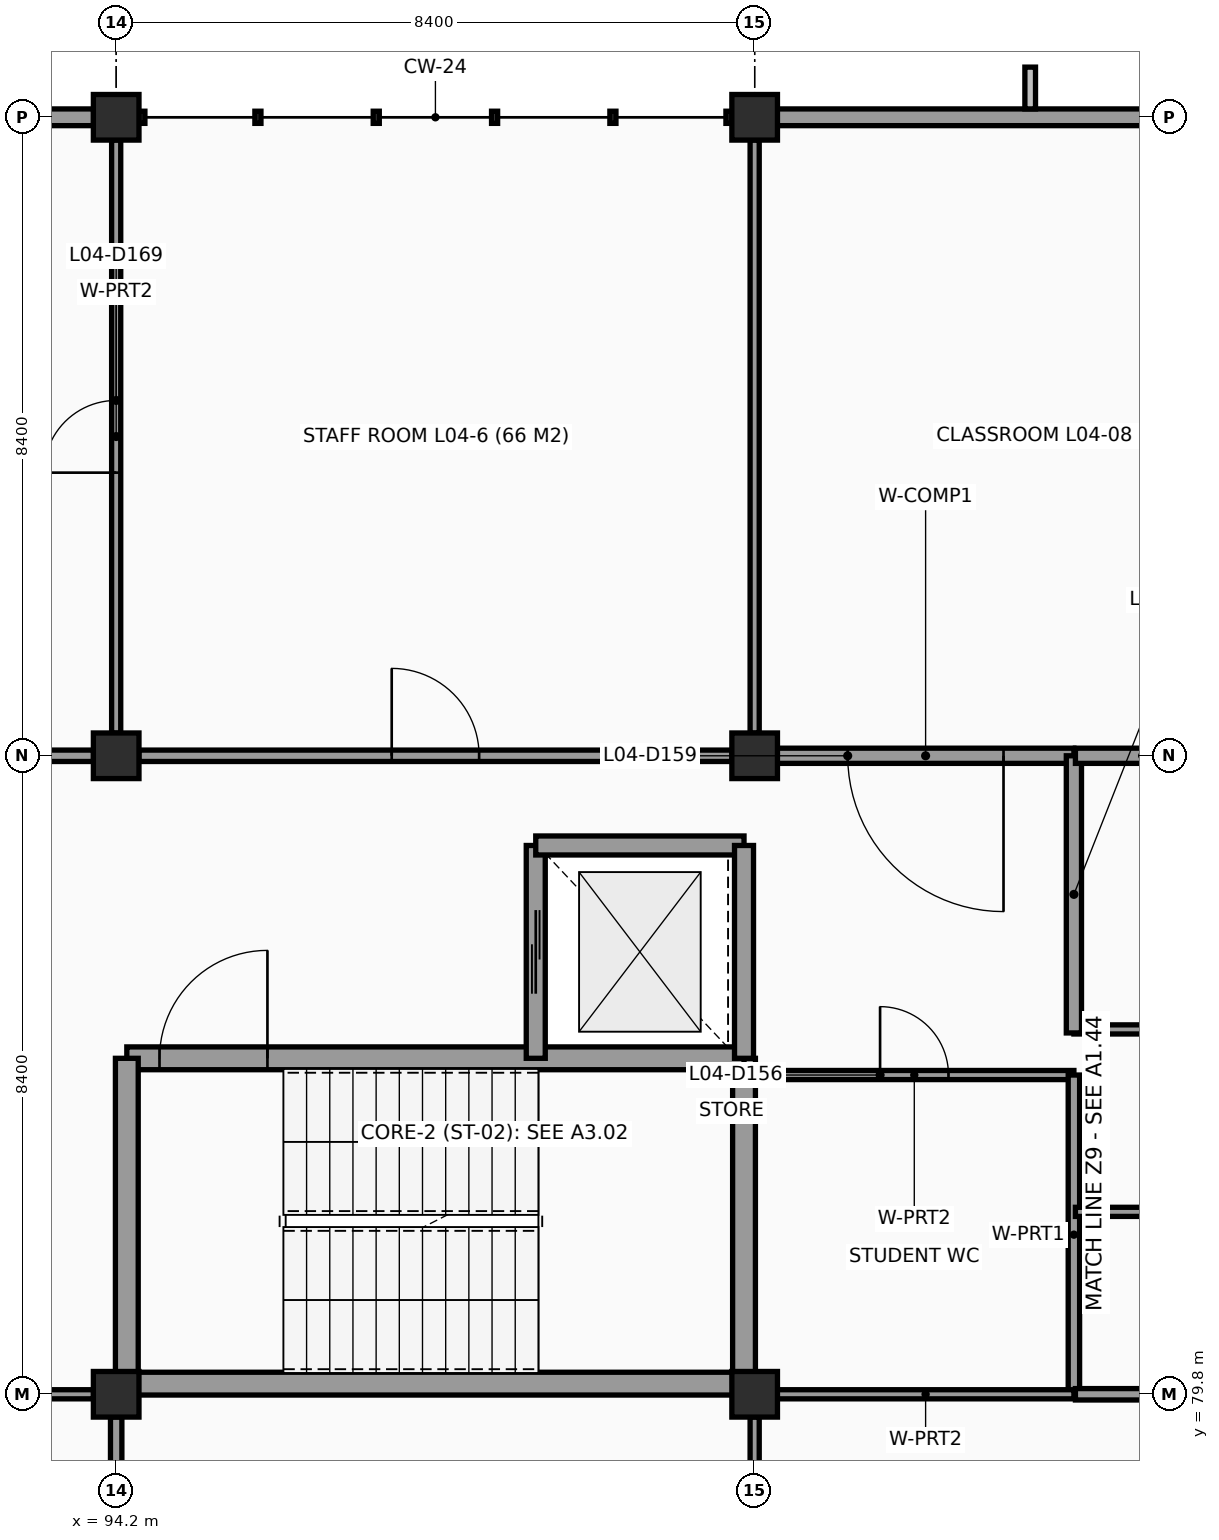
"""IFC4 building model, lengths in metres.
Left out: names, types, materials, properties, quantities, classifications, styles, units other than length and angle.
Written with IfcOpenShell. Run it as: python <this file> out.ifc"""

import sys

from ifc_helpers import new_model, si_unit, direction, frame, frame_2d, origin, origin_2d, place, context, subcontext, project, spatial, rectangle, extrude, element, fill, save


model = new_model("IFC4")
c1 = context("Model", 3, precision=1e-05, world=origin(), true_north=direction((0.0, 1.0)))
c2 = subcontext(c1, "Body", "Model", "MODEL_VIEW")
j1 = project(units=[si_unit("LENGTHUNIT", "METRE"), si_unit("PLANEANGLEUNIT", "RADIAN")], contexts=[c1])
p1 = place(None, origin())
s1 = spatial("IfcSite", under=j1, at=p1, CompositionType="ELEMENT")
p2 = place(p1, origin())
s2 = spatial("IfcBuilding", under=s1, at=p2, CompositionType="ELEMENT")
p3 = place(p2, frame((0.0, 0.0, 15.0)))
s3 = spatial("IfcBuildingStorey", under=s2, at=p3, CompositionType="ELEMENT", Elevation=15.0)
for number, where, z_axis, x_axis in (
    (1, (94.2, 79.8, 0.0), (0.0, 0.0, 1.0), (1.0, 0.0, 0.0)),
    (2, (94.2, 88.2, 0.0), (0.0, 0.0, 1.0), (1.0, 0.0, 0.0)),
    (3, (94.2, 96.6, 0.0), (0.0, 0.0, 1.0), (1.0, 0.0, 0.0)),
    (4, (102.6, 79.8, 0.0), (0.0, 0.0, 1.0), (1.0, 0.0, 0.0)),
    (5, (102.6, 88.2, 0.0), (0.0, 0.0, 1.0), (1.0, 0.0, 0.0)),
    (6, (102.6, 96.6, 0.0), (0.0, 0.0, 1.0), (1.0, 0.0, 0.0)),
):
    element("IfcColumn", number, at=place(p3, frame(where, z_axis=z_axis, x_axis=x_axis)), inside=s3, PredefinedType="COLUMN", context=c2, shape_type="SweptSolid", body=[
        extrude(rectangle(XDim=0.6, YDim=0.6, at=origin_2d()), origin(), (0.0, 0.0, 1.0), 3.6),
    ])
p4 = place(p3, frame((86.098, 96.6, 0.0), z_axis=(0.0, 0.0, 1.0), x_axis=(1.0, 0.0, 0.0)))
e7 = element("IfcWall", 7, at=p4, inside=s3, PredefinedType="SOLIDWALL", context=c2, shape_type="SweptSolid", body=[
    extrude(rectangle(XDim=7.804, YDim=0.22, at=frame_2d((3.902, 0.0))), origin(), (0.0, 0.0, 1.0), 2.65),
])
p5 = place(p4, frame((2.252, 0.0, 0.95)))
e8 = element("IfcOpeningElement", 8, at=p5, cuts=e7, PredefinedType="OPENING", context=c2, shape_type="SweptSolid", body=[
    extrude(rectangle(XDim=3.3, YDim=1.2, at=frame_2d((1.65, 0.6))), frame((0.0, 0.12, 0.0), z_axis=(0.0, -1.0, 0.0), x_axis=(1.0, 0.0, 0.0)), (0.0, 0.0, 1.0), 0.24),
])
p6 = place(p3, frame((102.898, 96.6, 0.0), z_axis=(0.0, 0.0, 1.0), x_axis=(1.0, 0.0, 0.0)))
e9 = element("IfcWall", 9, at=p6, inside=s3, PredefinedType="SOLIDWALL", context=c2, shape_type="SweptSolid", body=[
    extrude(rectangle(XDim=6.654, YDim=0.22, at=frame_2d((3.327, 0.0))), origin(), (0.0, 0.0, 1.0), 2.58),
])
p7 = place(p3, frame((94.34, 79.94, 0.0), z_axis=(0.0, 0.0, 1.0), x_axis=(1.0, 0.0, 0.0)))
e10 = element("IfcWall", 10, at=p7, inside=s3, PredefinedType="SHEAR", context=c2, shape_type="SweptSolid", body=[
    extrude(rectangle(XDim=8.12, YDim=0.3, at=frame_2d((4.06, 0.0))), origin(), (0.0, 0.0, 1.0), 3.6),
])
p8 = place(p3, frame((102.46, 79.94, 0.0), z_axis=(0.0, 0.0, 1.0), x_axis=(0.0, 1.0, 0.0)))
e11 = element("IfcWall", 11, at=p8, inside=s3, PredefinedType="SHEAR", context=c2, shape_type="SweptSolid", body=[
    extrude(rectangle(XDim=4.28, YDim=0.3, at=frame_2d((2.14, 0.0))), origin(), (0.0, 0.0, 1.0), 3.6),
])
p9 = place(p3, frame((102.46, 84.22, 0.0), z_axis=(0.0, 0.0, 1.0), x_axis=(-1.0, 0.0, 0.0)))
e12 = element("IfcWall", 12, at=p9, inside=s3, PredefinedType="SHEAR", context=c2, shape_type="SweptSolid", body=[
    extrude(rectangle(XDim=8.12, YDim=0.3, at=frame_2d((4.06, 0.0))), origin(), (0.0, 0.0, 1.0), 3.6),
])
p10 = place(p9, frame((6.27, 0.0, 0.0)))
e13 = element("IfcOpeningElement", 13, at=p10, cuts=e12, PredefinedType="OPENING", context=c2, shape_type="SweptSolid", body=[
    extrude(rectangle(XDim=1.42, YDim=2.15, at=frame_2d((0.71, 1.075))), frame((0.0, 0.16, 0.0), z_axis=(0.0, -1.0, 0.0), x_axis=(1.0, 0.0, 0.0)), (0.0, 0.0, 1.0), 0.32),
])
p11 = place(p3, frame((94.34, 84.22, 0.0), z_axis=(0.0, 0.0, 1.0), x_axis=(0.0, -1.0, 0.0)))
e14 = element("IfcWall", 14, at=p11, inside=s3, PredefinedType="SHEAR", context=c2, shape_type="SweptSolid", body=[
    extrude(rectangle(XDim=4.28, YDim=0.3, at=frame_2d((2.14, 0.0))), origin(), (0.0, 0.0, 1.0), 3.6),
])
p12 = place(p3, frame((99.72, 87.02, 0.0), z_axis=(0.0, 0.0, 1.0), x_axis=(0.0, -1.0, 0.0)))
e15 = element("IfcWall", 15, at=p12, inside=s3, PredefinedType="SHEAR", context=c2, shape_type="SweptSolid", body=[
    extrude(rectangle(XDim=2.8, YDim=0.25, at=frame_2d((1.4, 0.0))), origin(), (0.0, 0.0, 1.0), 3.6),
])
p13 = place(p12, frame((0.85, 0.0, 0.0)))
e16 = element("IfcOpeningElement", 16, at=p13, cuts=e15, PredefinedType="OPENING", context=c2, shape_type="SweptSolid", body=[
    extrude(rectangle(XDim=1.1, YDim=2.15, at=frame_2d((0.55, 1.075))), frame((0.0, 0.135, 0.0), z_axis=(0.0, -1.0, 0.0), x_axis=(1.0, 0.0, 0.0)), (0.0, 0.0, 1.0), 0.27),
])
p14 = place(p3, frame((102.46, 87.02, 0.0), z_axis=(0.0, 0.0, 1.0), x_axis=(-1.0, 0.0, 0.0)))
e17 = element("IfcWall", 17, at=p14, inside=s3, PredefinedType="SHEAR", context=c2, shape_type="SweptSolid", body=[
    extrude(rectangle(XDim=2.74, YDim=0.25, at=frame_2d((1.37, 0.0))), origin(), (0.0, 0.0, 1.0), 3.6),
])
p15 = place(p3, frame((102.46, 84.22, 0.0), z_axis=(0.0, 0.0, 1.0), x_axis=(0.0, 1.0, 0.0)))
e18 = element("IfcWall", 18, at=p15, inside=s3, PredefinedType="SHEAR", context=c2, shape_type="SweptSolid", body=[
    extrude(rectangle(XDim=2.8, YDim=0.25, at=frame_2d((1.4, 0.0))), origin(), (0.0, 0.0, 1.0), 3.6),
])
p16 = place(p3, frame((102.6, 84.0, 0.0), z_axis=(0.0, 0.0, 1.0), x_axis=(1.0, 0.0, 0.0)))
e19 = element("IfcWall", 19, at=p16, inside=s3, PredefinedType="PARTITIONING", context=c2, shape_type="SweptSolid", body=[
    extrude(rectangle(XDim=4.2, YDim=0.12, at=frame_2d((2.1, 0.0))), origin(), (0.0, 0.0, 1.0), 2.99),
])
p17 = place(p16, frame((1.65, 0.0, 0.0)))
e20 = element("IfcOpeningElement", 20, at=p17, cuts=e19, PredefinedType="OPENING", context=c2, shape_type="SweptSolid", body=[
    extrude(rectangle(XDim=0.9, YDim=2.1, at=frame_2d((0.45, 1.05))), frame((0.0, 0.07, 0.0), z_axis=(0.0, -1.0, 0.0), x_axis=(1.0, 0.0, 0.0)), (0.0, 0.0, 1.0), 0.14),
])
p18 = place(p3, frame((106.8, 84.0, 0.0), z_axis=(0.0, 0.0, 1.0), x_axis=(0.0, -1.0, 0.0)))
e21 = element("IfcWall", 21, at=p18, inside=s3, PredefinedType="PARTITIONING", context=c2, shape_type="SweptSolid", body=[
    extrude(rectangle(XDim=4.2, YDim=0.15, at=frame_2d((2.1, 0.0))), origin(), (0.0, 0.0, 1.0), 2.63),
])
p19 = place(p3, frame((106.8, 79.8, 0.0), z_axis=(0.0, 0.0, 1.0), x_axis=(-1.0, 0.0, 0.0)))
e22 = element("IfcWall", 22, at=p19, inside=s3, PredefinedType="PARTITIONING", context=c2, shape_type="SweptSolid", body=[
    extrude(rectangle(XDim=3.902, YDim=0.12, at=frame_2d((1.951, 0.0))), origin(), (0.0, 0.0, 1.0), 2.63),
])
p20 = place(p3, frame((110.777, 79.8, 0.0), z_axis=(0.0, 0.0, 1.0), x_axis=(-1.0, 0.0, 0.0)))
e23 = element("IfcWall", 23, at=p20, inside=s3, PredefinedType="PARTITIONING", context=c2, shape_type="SweptSolid", body=[
    extrude(rectangle(XDim=3.957, YDim=0.15, at=frame_2d((1.979, 0.0))), origin(), (0.0, 0.0, 1.0), 2.63),
])
p21 = place(p3, frame((106.82, 82.2, 0.0), z_axis=(0.0, 0.0, 1.0), x_axis=(1.0, 0.0, 0.0)))
e24 = element("IfcWall", 24, at=p21, inside=s3, PredefinedType="PARTITIONING", context=c2, shape_type="SweptSolid", body=[
    extrude(rectangle(XDim=4.18, YDim=0.12, at=frame_2d((2.09, 0.0))), origin(), (0.0, 0.0, 1.0), 2.63),
])
p22 = place(p21, frame((1.64, 0.0, 0.0)))
e25 = element("IfcOpeningElement", 25, at=p22, cuts=e24, PredefinedType="OPENING", context=c2, shape_type="SweptSolid", body=[
    extrude(rectangle(XDim=0.9, YDim=2.1, at=frame_2d((0.45, 1.05))), frame((0.0, 0.07, 0.0), z_axis=(0.0, -1.0, 0.0), x_axis=(1.0, 0.0, 0.0)), (0.0, 0.0, 1.0), 0.14),
])
p23 = place(p3, frame((106.8, 84.6, 0.0), z_axis=(0.0, 0.0, 1.0), x_axis=(1.0, 0.0, 0.0)))
e26 = element("IfcWall", 26, at=p23, inside=s3, PredefinedType="PARTITIONING", context=c2, shape_type="SweptSolid", body=[
    extrude(rectangle(XDim=4.2, YDim=0.12, at=frame_2d((2.1, 0.0))), origin(), (0.0, 0.0, 1.0), 2.63),
])
p24 = place(p23, frame((1.61, 0.0, 0.0)))
e27 = element("IfcOpeningElement", 27, at=p24, cuts=e26, PredefinedType="OPENING", context=c2, shape_type="SweptSolid", body=[
    extrude(rectangle(XDim=0.98, YDim=2.1, at=frame_2d((0.49, 1.05))), frame((0.0, 0.07, 0.0), z_axis=(0.0, -1.0, 0.0), x_axis=(1.0, 0.0, 0.0)), (0.0, 0.0, 1.0), 0.14),
])
p25 = place(p3, frame((102.898, 88.2, 0.0), z_axis=(0.0, 0.0, 1.0), x_axis=(1.0, 0.0, 0.0)))
e28 = element("IfcWall", 28, at=p25, inside=s3, PredefinedType="PARTITIONING", context=c2, shape_type="SweptSolid", body=[
    extrude(rectangle(XDim=3.902, YDim=0.2, at=frame_2d((1.951, 0.0))), origin(), (0.0, 0.0, 1.0), 2.48),
])
p26 = place(p25, frame((0.926, 0.0, 0.0)))
e29 = element("IfcOpeningElement", 29, at=p26, cuts=e28, PredefinedType="OPENING", context=c2, shape_type="SweptSolid", body=[
    extrude(rectangle(XDim=2.05, YDim=2.35, at=frame_2d((1.025, 1.175))), frame((0.0, 0.11, 0.0), z_axis=(0.0, -1.0, 0.0), x_axis=(1.0, 0.0, 0.0)), (0.0, 0.0, 1.0), 0.22),
])
p27 = place(p3, frame((106.8, 88.2, 0.0), z_axis=(0.0, 0.0, 1.0), x_axis=(0.0, -1.0, 0.0)))
e30 = element("IfcWall", 30, at=p27, inside=s3, PredefinedType="PARTITIONING", context=c2, shape_type="SweptSolid", body=[
    extrude(rectangle(XDim=3.646, YDim=0.2, at=frame_2d((1.823, 0.0))), origin(), (0.0, 0.0, 1.0), 2.48),
])
p28 = place(p3, frame((106.82, 88.2, 0.0), z_axis=(0.0, 0.0, 1.0), x_axis=(1.0, 0.0, 0.0)))
e31 = element("IfcWall", 31, at=p28, inside=s3, PredefinedType="PARTITIONING", context=c2, shape_type="SweptSolid", body=[
    extrude(rectangle(XDim=3.957, YDim=0.2, at=frame_2d((1.979, 0.0))), origin(), (0.0, 0.0, 1.0), 2.48),
])
p29 = place(p28, frame((0.878, 0.0, 0.0)))
e32 = element("IfcOpeningElement", 32, at=p29, cuts=e31, PredefinedType="OPENING", context=c2, shape_type="SweptSolid", body=[
    extrude(rectangle(XDim=0.9, YDim=2.05, at=frame_2d((0.45, 1.025))), frame((0.0, 0.11, 0.0), z_axis=(0.0, -1.0, 0.0), x_axis=(1.0, 0.0, 0.0)), (0.0, 0.0, 1.0), 0.22),
])
p30 = place(p3, frame((86.098, 79.8, 0.0), z_axis=(0.0, 0.0, 1.0), x_axis=(1.0, 0.0, 0.0)))
e33 = element("IfcWall", 33, at=p30, inside=s3, PredefinedType="PARTITIONING", context=c2, shape_type="SweptSolid", body=[
    extrude(rectangle(XDim=7.804, YDim=0.12, at=frame_2d((3.902, 0.0))), origin(), (0.0, 0.0, 1.0), 2.7),
])
p31 = place(p3, frame((94.2, 79.502, 0.0), z_axis=(0.0, 0.0, 1.0), x_axis=(0.0, -1.0, 0.0)))
e34 = element("IfcWall", 34, at=p31, inside=s3, PredefinedType="PARTITIONING", context=c2, shape_type="SweptSolid", body=[
    extrude(rectangle(XDim=5.702, YDim=0.15, at=frame_2d((2.851, 0.0))), origin(), (0.0, 0.0, 1.0), 2.95),
])
p32 = place(p3, frame((86.098, 88.2, 0.0), z_axis=(0.0, 0.0, 1.0), x_axis=(1.0, 0.0, 0.0)))
e35 = element("IfcWall", 35, at=p32, inside=s3, PredefinedType="PARTITIONING", context=c2, shape_type="SweptSolid", body=[
    extrude(rectangle(XDim=7.804, YDim=0.15, at=frame_2d((3.902, 0.0))), origin(), (0.0, 0.0, 1.0), 2.55),
])
p33 = place(p32, frame((2.952, 0.0, 0.0)))
e36 = element("IfcOpeningElement", 36, at=p33, cuts=e35, PredefinedType="OPENING", context=c2, shape_type="SweptSolid", body=[
    extrude(rectangle(XDim=1.9, YDim=2.3, at=frame_2d((0.95, 1.15))), frame((0.0, 0.085, 0.0), z_axis=(0.0, -1.0, 0.0), x_axis=(1.0, 0.0, 0.0)), (0.0, 0.0, 1.0), 0.17),
])
p34 = place(p3, frame((94.2, 96.302, 0.0), z_axis=(0.0, 0.0, 1.0), x_axis=(0.0, -1.0, 0.0)))
e37 = element("IfcWall", 37, at=p34, inside=s3, PredefinedType="PARTITIONING", context=c2, shape_type="SweptSolid", body=[
    extrude(rectangle(XDim=7.804, YDim=0.12, at=frame_2d((3.902, 0.0))), origin(), (0.0, 0.0, 1.0), 2.95),
])
p35 = place(p34, frame((3.427, 0.0, 0.0)))
e38 = element("IfcOpeningElement", 38, at=p35, cuts=e37, PredefinedType="OPENING", context=c2, shape_type="SweptSolid", body=[
    extrude(rectangle(XDim=0.95, YDim=2.1, at=frame_2d((0.475, 1.05))), frame((0.0, 0.07, 0.0), z_axis=(0.0, -1.0, 0.0), x_axis=(1.0, 0.0, 0.0)), (0.0, 0.0, 1.0), 0.14),
])
p36 = place(p3, frame((102.6, 79.502, 0.0), z_axis=(0.0, 0.0, 1.0), x_axis=(0.0, -1.0, 0.0)))
e39 = element("IfcWall", 39, at=p36, inside=s3, PredefinedType="PARTITIONING", context=c2, shape_type="SweptSolid", body=[
    extrude(rectangle(XDim=5.702, YDim=0.12, at=frame_2d((2.851, 0.0))), origin(), (0.0, 0.0, 1.0), 2.99),
])
p37 = place(p36, frame((2.351, 0.0, 0.0)))
e40 = element("IfcOpeningElement", 40, at=p37, cuts=e39, PredefinedType="OPENING", context=c2, shape_type="SweptSolid", body=[
    extrude(rectangle(XDim=1.0, YDim=2.1, at=frame_2d((0.5, 1.05))), frame((0.0, 0.07, 0.0), z_axis=(0.0, -1.0, 0.0), x_axis=(1.0, 0.0, 0.0)), (0.0, 0.0, 1.0), 0.14),
])
p38 = place(p3, frame((102.302, 88.2, 0.0), z_axis=(0.0, 0.0, 1.0), x_axis=(-1.0, 0.0, 0.0)))
e41 = element("IfcWall", 41, at=p38, inside=s3, PredefinedType="PARTITIONING", context=c2, shape_type="SweptSolid", body=[
    extrude(rectangle(XDim=7.804, YDim=0.15, at=frame_2d((3.902, 0.0))), origin(), (0.0, 0.0, 1.0), 2.55),
])
p39 = place(p38, frame((3.327, 0.0, 0.0)))
e42 = element("IfcOpeningElement", 42, at=p39, cuts=e41, PredefinedType="OPENING", context=c2, shape_type="SweptSolid", body=[
    extrude(rectangle(XDim=1.15, YDim=2.15, at=frame_2d((0.575, 1.075))), frame((0.0, 0.085, 0.0), z_axis=(0.0, -1.0, 0.0), x_axis=(1.0, 0.0, 0.0)), (0.0, 0.0, 1.0), 0.17),
])
p40 = place(p3, frame((102.6, 96.302, 0.0), z_axis=(0.0, 0.0, 1.0), x_axis=(0.0, -1.0, 0.0)))
e43 = element("IfcWall", 43, at=p40, inside=s3, PredefinedType="PARTITIONING", context=c2, shape_type="SweptSolid", body=[
    extrude(rectangle(XDim=7.804, YDim=0.12, at=frame_2d((3.902, 0.0))), origin(), (0.0, 0.0, 1.0), 2.99),
])
p41 = place(p10, frame((1.42, 0.0, 0.0), z_axis=(0.0, 0.0, 1.0), x_axis=(-1.0, 0.0, 0.0)))
e44 = element("IfcDoor", 44, at=p41, inside=s3, OperationType="SINGLE_SWING_LEFT", PredefinedType="DOOR", context=c2, shape_type="SweptSolid", body=[
    extrude(rectangle(XDim=1.42, YDim=2.15, at=frame_2d((0.71, 1.075))), frame((0.0, 0.025, 0.0), z_axis=(0.0, -1.0, 0.0), x_axis=(1.0, 0.0, 0.0)), (0.0, 0.0, 1.0), 0.05),
])
fill(e13, e44)
p42 = place(p13, origin())
e45 = element("IfcDoor", 45, at=p42, inside=s3, OperationType="DOUBLE_DOOR_SLIDING", PredefinedType="DOOR", context=c2, shape_type="SweptSolid", body=[
    extrude(rectangle(XDim=1.1, YDim=2.15, at=frame_2d((0.55, 1.075))), frame((0.0, 0.025, 0.0), z_axis=(0.0, -1.0, 0.0), x_axis=(1.0, 0.0, 0.0)), (0.0, 0.0, 1.0), 0.05),
])
fill(e16, e45)
p43 = place(p17, origin())
e46 = element("IfcDoor", 46, at=p43, inside=s3, OperationType="SINGLE_SWING_LEFT", PredefinedType="DOOR", context=c2, shape_type="SweptSolid", body=[
    extrude(rectangle(XDim=0.9, YDim=2.1, at=frame_2d((0.45, 1.05))), frame((0.0, 0.025, 0.0), z_axis=(0.0, -1.0, 0.0), x_axis=(1.0, 0.0, 0.0)), (0.0, 0.0, 1.0), 0.05),
])
fill(e20, e46)
p44 = place(p26, origin())
e47 = element("IfcDoor", 47, at=p44, inside=s3, OperationType="DOUBLE_DOOR_SINGLE_SWING", PredefinedType="DOOR", context=c2, shape_type="SweptSolid", body=[
    extrude(rectangle(XDim=2.05, YDim=2.35, at=frame_2d((1.025, 1.175))), frame((0.0, 0.025, 0.0), z_axis=(0.0, -1.0, 0.0), x_axis=(1.0, 0.0, 0.0)), (0.0, 0.0, 1.0), 0.05),
])
fill(e29, e47)
p45 = place(p35, origin())
e48 = element("IfcDoor", 48, at=p45, inside=s3, OperationType="SINGLE_SWING_RIGHT", PredefinedType="DOOR", context=c2, shape_type="SweptSolid", body=[
    extrude(rectangle(XDim=0.95, YDim=2.1, at=frame_2d((0.475, 1.05))), frame((0.0, 0.025, 0.0), z_axis=(0.0, -1.0, 0.0), x_axis=(1.0, 0.0, 0.0)), (0.0, 0.0, 1.0), 0.05),
])
fill(e38, e48)
p46 = place(p39, origin())
e49 = element("IfcDoor", 49, at=p46, inside=s3, OperationType="SINGLE_SWING_RIGHT", PredefinedType="DOOR", context=c2, shape_type="SweptSolid", body=[
    extrude(rectangle(XDim=1.15, YDim=2.15, at=frame_2d((0.575, 1.075))), frame((0.0, 0.025, 0.0), z_axis=(0.0, -1.0, 0.0), x_axis=(1.0, 0.0, 0.0)), (0.0, 0.0, 1.0), 0.05),
])
fill(e42, e49)
save(model, sys.argv[1])
